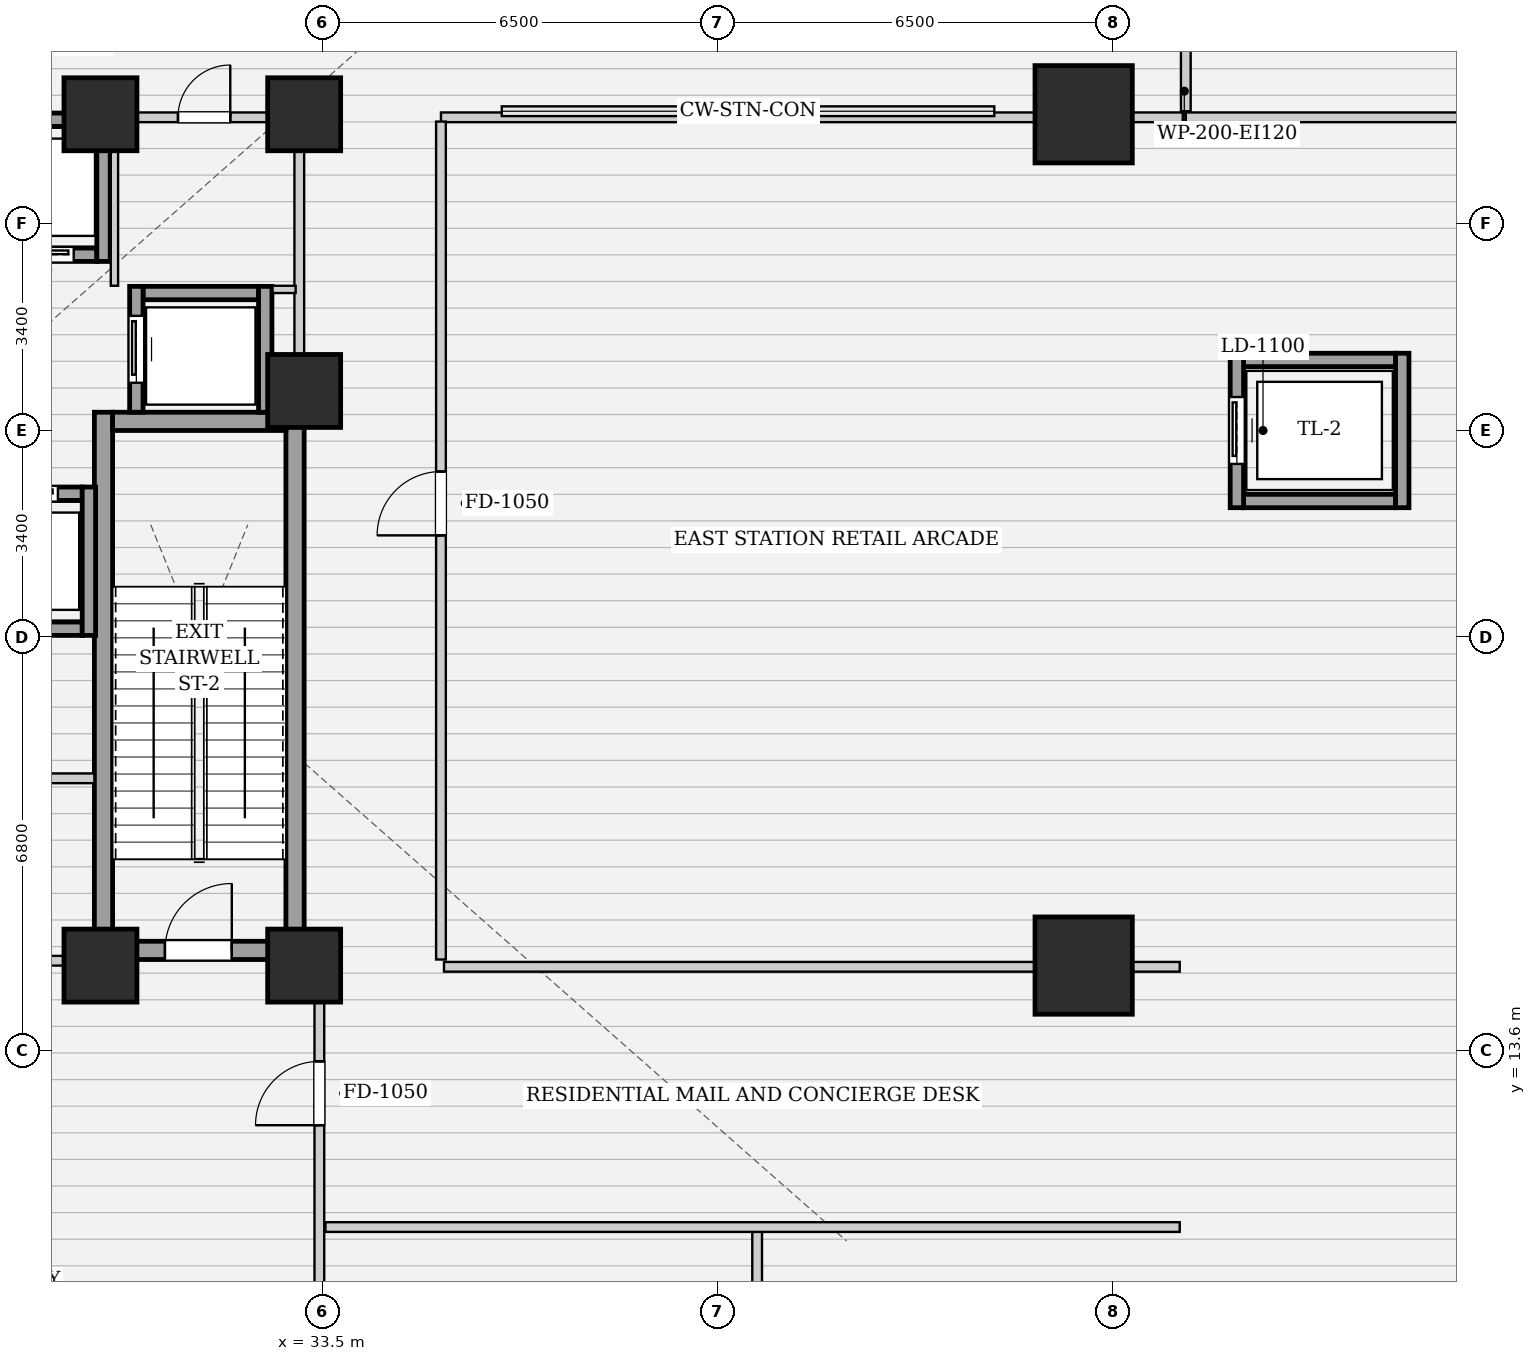
"""IFC4 building model, lengths in metres.
Left out: names, types, materials, properties, quantities, classifications, styles, units other than length and angle.
Written with IfcOpenShell. Run it as: python <this file> out.ifc"""

import sys

from ifc_helpers import new_model, si_unit, direction, frame, frame_2d, origin, origin_2d, place, context, subcontext, project, spatial, rectangle, extrude, element, fill, save


model = new_model("IFC4")
c1 = context("Model", 3, precision=1e-05, world=origin(), true_north=direction((0.0, 1.0)))
c2 = subcontext(c1, "Body", "Model", "MODEL_VIEW")
j1 = project(units=[si_unit("LENGTHUNIT", "METRE"), si_unit("PLANEANGLEUNIT", "RADIAN")], contexts=[c1])
p1 = place(None, origin())
s1 = spatial("IfcSite", under=j1, at=p1, CompositionType="ELEMENT")
p2 = place(p1, origin())
s2 = spatial("IfcBuilding", under=s1, at=p2, CompositionType="ELEMENT")
p3 = place(p2, origin())
s3 = spatial("IfcBuildingStorey", under=s2, at=p3, CompositionType="ELEMENT", Elevation=0.0)
for number, where, z_axis, x_axis in (
    (1, (46.02, 15.0, 0.0), (0.0, 0.0, 1.0), (1.0, 0.0, 0.0)),
    (2, (46.02, 29.0, 0.0), (0.0, 0.0, 1.0), (1.0, 0.0, 0.0)),
):
    element("IfcColumn", number, at=place(p3, frame(where, z_axis=z_axis, x_axis=x_axis)), inside=s3, PredefinedType="COLUMN", context=c2, shape_type="SweptSolid", body=[
        extrude(rectangle(XDim=1.6, YDim=1.6, at=origin_2d()), origin(), (0.0, 0.0, 1.0), 6.0),
    ])
for number, where, z_axis, x_axis in (
    (3, (29.85, 15.0, 0.0), (0.0, 0.0, 1.0), (1.0, 0.0, 0.0)),
    (4, (33.2, 15.0, 0.0), (0.0, 0.0, 1.0), (1.0, 0.0, 0.0)),
    (5, (29.85, 29.0, 0.0), (0.0, 0.0, 1.0), (1.0, 0.0, 0.0)),
    (6, (33.2, 29.0, 0.0), (0.0, 0.0, 1.0), (1.0, 0.0, 0.0)),
    (7, (33.2, 24.45, 0.0), (0.0, 0.0, 1.0), (1.0, 0.0, 0.0)),
):
    element("IfcColumn", number, at=place(p3, frame(where, z_axis=z_axis, x_axis=x_axis)), inside=s3, PredefinedType="COLUMN", context=c2, shape_type="SweptSolid", body=[
        extrude(rectangle(XDim=1.2, YDim=1.2, at=origin_2d()), origin(), (0.0, 0.0, 1.0), 6.0),
    ])
for number, where, z_axis, x_axis in (
    (8, (29.9, 15.1, 0.0), (0.0, 0.0, 1.0), (0.0, 1.0, 0.0)),
    (9, (33.05, 15.1, 0.0), (0.0, 0.0, 1.0), (0.0, 1.0, 0.0)),
):
    element("IfcWall", number, at=place(p3, frame(where, z_axis=z_axis, x_axis=x_axis)), inside=s3, PredefinedType="SHEAR", context=c2, shape_type="SweptSolid", body=[
        extrude(rectangle(XDim=9.0, YDim=0.3, at=frame_2d((4.5, 0.0))), origin(), (0.0, 0.0, 1.0), 5.68),
    ])
p4 = place(p3, frame((30.05, 23.95, 0.0), z_axis=(0.0, 0.0, 1.0), x_axis=(1.0, 0.0, 0.0)))
e10 = element("IfcWall", 10, at=p4, inside=s3, PredefinedType="SHEAR", context=c2, shape_type="SweptSolid", body=[
    extrude(rectangle(XDim=2.85, YDim=0.3, at=frame_2d((1.425, 0.0))), origin(), (0.0, 0.0, 1.0), 5.68),
])
p5 = place(p3, frame((30.05, 15.25, 0.0), z_axis=(0.0, 0.0, 1.0), x_axis=(1.0, 0.0, 0.0)))
e11 = element("IfcWall", 11, at=p5, inside=s3, PredefinedType="SHEAR", context=c2, shape_type="SweptSolid", body=[
    extrude(rectangle(XDim=2.85, YDim=0.3, at=frame_2d((1.425, 0.0))), origin(), (0.0, 0.0, 1.0), 5.68),
])
p6 = place(p5, frame((0.86, 0.0, 0.0)))
e12 = element("IfcOpeningElement", 12, at=p6, cuts=e11, PredefinedType="OPENING", context=c2, shape_type="SweptSolid", body=[
    extrude(rectangle(XDim=1.1, YDim=2.05, at=frame_2d((0.55, 1.025))), frame((0.0, 0.16, 0.0), z_axis=(0.0, -1.0, 0.0), x_axis=(1.0, 0.0, 0.0)), (0.0, 0.0, 1.0), 0.32),
])
p7 = place(p3, frame((27.93, 26.69, 0.0), z_axis=(0.0, 0.0, 1.0), x_axis=(1.0, 0.0, 0.0)))
e13 = element("IfcWall", 13, at=p7, inside=s3, PredefinedType="SHEAR", context=c2, shape_type="SweptSolid", body=[
    extrude(rectangle(XDim=1.86, YDim=0.22, at=frame_2d((0.93, 0.0))), origin(), (0.0, 0.0, 1.0), 5.68),
])
p8 = place(p7, frame((0.38, 0.0, 0.0)))
e14 = element("IfcOpeningElement", 14, at=p8, cuts=e13, PredefinedType="OPENING", context=c2, shape_type="SweptSolid", body=[
    extrude(rectangle(XDim=1.1, YDim=2.15, at=frame_2d((0.55, 1.075))), frame((0.0, 0.12, 0.0), z_axis=(0.0, -1.0, 0.0), x_axis=(1.0, 0.0, 0.0)), (0.0, 0.0, 1.0), 0.24),
])
p9 = place(p3, frame((27.93, 28.91, 0.0), z_axis=(0.0, 0.0, 1.0), x_axis=(1.0, 0.0, 0.0)))
e15 = element("IfcWall", 15, at=p9, inside=s3, PredefinedType="SHEAR", context=c2, shape_type="SweptSolid", body=[
    extrude(rectangle(XDim=1.86, YDim=0.22, at=frame_2d((0.93, 0.0))), origin(), (0.0, 0.0, 1.0), 5.68),
])
p10 = place(p3, frame((29.9, 26.58, 0.0), z_axis=(0.0, 0.0, 1.0), x_axis=(0.0, 1.0, 0.0)))
e16 = element("IfcWall", 16, at=p10, inside=s3, PredefinedType="SHEAR", context=c2, shape_type="SweptSolid", body=[
    extrude(rectangle(XDim=2.44, YDim=0.22, at=frame_2d((1.22, 0.0))), origin(), (0.0, 0.0, 1.0), 5.68),
])
p11 = place(p3, frame((27.65, 20.54, 0.0), z_axis=(0.0, 0.0, 1.0), x_axis=(1.0, 0.0, 0.0)))
e17 = element("IfcWall", 17, at=p11, inside=s3, PredefinedType="SHEAR", context=c2, shape_type="SweptSolid", body=[
    extrude(rectangle(XDim=1.9, YDim=0.22, at=frame_2d((0.95, 0.0))), origin(), (0.0, 0.0, 1.0), 5.68),
])
p12 = place(p3, frame((27.65, 22.76, 0.0), z_axis=(0.0, 0.0, 1.0), x_axis=(1.0, 0.0, 0.0)))
e18 = element("IfcWall", 18, at=p12, inside=s3, PredefinedType="SHEAR", context=c2, shape_type="SweptSolid", body=[
    extrude(rectangle(XDim=1.9, YDim=0.22, at=frame_2d((0.95, 0.0))), origin(), (0.0, 0.0, 1.0), 5.68),
])
p13 = place(p12, frame((0.4, 0.0, 0.0)))
e19 = element("IfcOpeningElement", 19, at=p13, cuts=e18, PredefinedType="OPENING", context=c2, shape_type="SweptSolid", body=[
    extrude(rectangle(XDim=1.1, YDim=2.15, at=frame_2d((0.55, 1.075))), frame((0.0, 0.12, 0.0), z_axis=(0.0, -1.0, 0.0), x_axis=(1.0, 0.0, 0.0)), (0.0, 0.0, 1.0), 0.24),
])
p14 = place(p3, frame((29.66, 20.43, 0.0), z_axis=(0.0, 0.0, 1.0), x_axis=(0.0, 1.0, 0.0)))
e20 = element("IfcWall", 20, at=p14, inside=s3, PredefinedType="SHEAR", context=c2, shape_type="SweptSolid", body=[
    extrude(rectangle(XDim=2.44, YDim=0.22, at=frame_2d((1.22, 0.0))), origin(), (0.0, 0.0, 1.0), 5.68),
])
p15 = place(p3, frame((30.55, 26.06, 0.0), z_axis=(0.0, 0.0, 1.0), x_axis=(1.0, 0.0, 0.0)))
e21 = element("IfcWall", 21, at=p15, inside=s3, PredefinedType="SHEAR", context=c2, shape_type="SweptSolid", body=[
    extrude(rectangle(XDim=1.9, YDim=0.22, at=frame_2d((0.95, 0.0))), origin(), (0.0, 0.0, 1.0), 5.68),
])
p16 = place(p3, frame((30.44, 24.1, 0.0), z_axis=(0.0, 0.0, 1.0), x_axis=(0.0, 1.0, 0.0)))
e22 = element("IfcWall", 22, at=p16, inside=s3, PredefinedType="SHEAR", context=c2, shape_type="SweptSolid", body=[
    extrude(rectangle(XDim=2.07, YDim=0.22, at=frame_2d((1.035, 0.0))), origin(), (0.0, 0.0, 1.0), 5.68),
])
p17 = place(p16, frame((0.485, 0.0, 0.0)))
e23 = element("IfcOpeningElement", 23, at=p17, cuts=e22, PredefinedType="OPENING", context=c2, shape_type="SweptSolid", body=[
    extrude(rectangle(XDim=1.1, YDim=2.15, at=frame_2d((0.55, 1.075))), frame((0.0, 0.12, 0.0), z_axis=(0.0, -1.0, 0.0), x_axis=(1.0, 0.0, 0.0)), (0.0, 0.0, 1.0), 0.24),
])
p18 = place(p3, frame((32.56, 24.1, 0.0), z_axis=(0.0, 0.0, 1.0), x_axis=(0.0, 1.0, 0.0)))
e24 = element("IfcWall", 24, at=p18, inside=s3, PredefinedType="SHEAR", context=c2, shape_type="SweptSolid", body=[
    extrude(rectangle(XDim=2.07, YDim=0.22, at=frame_2d((1.035, 0.0))), origin(), (0.0, 0.0, 1.0), 5.68),
])
for number, where, z_axis, x_axis in (
    (25, (48.65, 22.64, 0.0), (0.0, 0.0, 1.0), (1.0, 0.0, 0.0)),
    (26, (48.65, 24.96, 0.0), (0.0, 0.0, 1.0), (1.0, 0.0, 0.0)),
):
    element("IfcWall", number, at=place(p3, frame(where, z_axis=z_axis, x_axis=x_axis)), inside=s3, PredefinedType="SHEAR", context=c2, shape_type="SweptSolid", body=[
        extrude(rectangle(XDim=2.5, YDim=0.22, at=frame_2d((1.25, 0.0))), origin(), (0.0, 0.0, 1.0), 5.68),
    ])
p19 = place(p3, frame((48.54, 22.53, 0.0), z_axis=(0.0, 0.0, 1.0), x_axis=(0.0, 1.0, 0.0)))
e27 = element("IfcWall", 27, at=p19, inside=s3, PredefinedType="SHEAR", context=c2, shape_type="SweptSolid", body=[
    extrude(rectangle(XDim=2.54, YDim=0.22, at=frame_2d((1.27, 0.0))), origin(), (0.0, 0.0, 1.0), 5.68),
])
p20 = place(p19, frame((0.72, 0.0, 0.0)))
e28 = element("IfcOpeningElement", 28, at=p20, cuts=e27, PredefinedType="OPENING", context=c2, shape_type="SweptSolid", body=[
    extrude(rectangle(XDim=1.1, YDim=2.15, at=frame_2d((0.55, 1.075))), frame((0.0, 0.12, 0.0), z_axis=(0.0, -1.0, 0.0), x_axis=(1.0, 0.0, 0.0)), (0.0, 0.0, 1.0), 0.24),
])
p21 = place(p3, frame((51.26, 22.53, 0.0), z_axis=(0.0, 0.0, 1.0), x_axis=(0.0, 1.0, 0.0)))
e29 = element("IfcWall", 29, at=p21, inside=s3, PredefinedType="SHEAR", context=c2, shape_type="SweptSolid", body=[
    extrude(rectangle(XDim=2.54, YDim=0.22, at=frame_2d((1.27, 0.0))), origin(), (0.0, 0.0, 1.0), 5.68),
])
p22 = place(p3, frame((21.25, 15.08, 0.0), z_axis=(0.0, 0.0, 1.0), x_axis=(1.0, 0.0, 0.0)))
e30 = element("IfcWall", 30, at=p22, inside=s3, PredefinedType="PARTITIONING", context=c2, shape_type="SweptSolid", body=[
    extrude(rectangle(XDim=8.5, YDim=0.16, at=frame_2d((4.25, 0.0))), origin(), (0.0, 0.0, 1.0), 5.68),
])
p23 = place(p22, frame((3.725, 0.0, 0.0)))
e31 = element("IfcOpeningElement", 31, at=p23, cuts=e30, PredefinedType="OPENING", context=c2, shape_type="SweptSolid", body=[
    extrude(rectangle(XDim=1.05, YDim=2.05, at=frame_2d((0.525, 1.025))), frame((0.0, 0.09, 0.0), z_axis=(0.0, -1.0, 0.0), x_axis=(1.0, 0.0, 0.0)), (0.0, 0.0, 1.0), 0.18),
])
p24 = place(p3, frame((28.65, 18.08, 0.0), z_axis=(0.0, 0.0, 1.0), x_axis=(1.0, 0.0, 0.0)))
e32 = element("IfcWall", 32, at=p24, inside=s3, PredefinedType="PARTITIONING", context=c2, shape_type="SweptSolid", body=[
    extrude(rectangle(XDim=1.1, YDim=0.16, at=frame_2d((0.55, 0.0))), origin(), (0.0, 0.0, 1.0), 5.68),
])
p25 = place(p3, frame((33.12, 24.12, 0.0), z_axis=(0.0, 0.0, 1.0), x_axis=(0.0, 1.0, 0.0)))
e33 = element("IfcWall", 33, at=p25, inside=s3, PredefinedType="PARTITIONING", context=c2, shape_type="SweptSolid", body=[
    extrude(rectangle(XDim=4.76, YDim=0.16, at=frame_2d((2.38, 0.0))), origin(), (0.0, 0.0, 1.0), 5.68),
])
p26 = place(p3, frame((30.08, 26.18, 0.0), z_axis=(0.0, 0.0, 1.0), x_axis=(0.0, 1.0, 0.0)))
e34 = element("IfcWall", 34, at=p26, inside=s3, PredefinedType="PARTITIONING", context=c2, shape_type="SweptSolid", body=[
    extrude(rectangle(XDim=2.68, YDim=0.12, at=frame_2d((1.34, 0.0))), origin(), (0.0, 0.0, 1.0), 5.68),
])
p27 = place(p3, frame((32.68, 26.12, 0.0), z_axis=(0.0, 0.0, 1.0), x_axis=(1.0, 0.0, 0.0)))
e35 = element("IfcWall", 35, at=p27, inside=s3, PredefinedType="PARTITIONING", context=c2, shape_type="SweptSolid", body=[
    extrude(rectangle(XDim=0.38, YDim=0.12, at=frame_2d((0.19, 0.0))), origin(), (0.0, 0.0, 1.0), 5.68),
])
p28 = place(p3, frame((30.08, 28.95, 0.0), z_axis=(0.0, 0.0, 1.0), x_axis=(1.0, 0.0, 0.0)))
e36 = element("IfcWall", 36, at=p28, inside=s3, PredefinedType="PARTITIONING", context=c2, shape_type="SweptSolid", body=[
    extrude(rectangle(XDim=2.96, YDim=0.16, at=frame_2d((1.48, 0.0))), origin(), (0.0, 0.0, 1.0), 5.68),
])
p29 = place(p28, frame((1.045, 0.0, 0.0)))
e37 = element("IfcOpeningElement", 37, at=p29, cuts=e36, PredefinedType="OPENING", context=c2, shape_type="SweptSolid", body=[
    extrude(rectangle(XDim=0.86, YDim=2.05, at=frame_2d((0.43, 1.025))), frame((0.0, 0.09, 0.0), z_axis=(0.0, -1.0, 0.0), x_axis=(1.0, 0.0, 0.0)), (0.0, 0.0, 1.0), 0.18),
])
p30 = place(p3, frame((33.45, 5.6, 0.0), z_axis=(0.0, 0.0, 1.0), x_axis=(0.0, 1.0, 0.0)))
e38 = element("IfcWall", 38, at=p30, inside=s3, PredefinedType="PARTITIONING", context=c2, shape_type="SweptSolid", body=[
    extrude(rectangle(XDim=9.3, YDim=0.16, at=frame_2d((4.65, 0.0))), origin(), (0.0, 0.0, 1.0), 5.68),
])
p31 = place(p30, frame((2.175, 0.0, 0.0)))
e39 = element("IfcOpeningElement", 39, at=p31, cuts=e38, PredefinedType="OPENING", context=c2, shape_type="SweptSolid", body=[
    extrude(rectangle(XDim=1.05, YDim=2.05, at=frame_2d((0.525, 1.025))), frame((0.0, 0.09, 0.0), z_axis=(0.0, -1.0, 0.0), x_axis=(1.0, 0.0, 0.0)), (0.0, 0.0, 1.0), 0.18),
])
p32 = place(p30, frame((6.775, 0.0, 0.0)))
e40 = element("IfcOpeningElement", 40, at=p32, cuts=e38, PredefinedType="OPENING", context=c2, shape_type="SweptSolid", body=[
    extrude(rectangle(XDim=1.05, YDim=2.05, at=frame_2d((0.525, 1.025))), frame((0.0, 0.09, 0.0), z_axis=(0.0, -1.0, 0.0), x_axis=(1.0, 0.0, 0.0)), (0.0, 0.0, 1.0), 0.18),
])
p33 = place(p3, frame((40.65, 5.58, 0.0), z_axis=(0.0, 0.0, 1.0), x_axis=(0.0, 1.0, 0.0)))
e41 = element("IfcWall", 41, at=p33, inside=s3, PredefinedType="PARTITIONING", context=c2, shape_type="SweptSolid", body=[
    extrude(rectangle(XDim=5.07, YDim=0.16, at=frame_2d((2.535, 0.0))), origin(), (0.0, 0.0, 1.0), 5.68),
])
p34 = place(p3, frame((33.55, 10.7, 0.0), z_axis=(0.0, 0.0, 1.0), x_axis=(1.0, 0.0, 0.0)))
e42 = element("IfcWall", 42, at=p34, inside=s3, PredefinedType="PARTITIONING", context=c2, shape_type="SweptSolid", body=[
    extrude(rectangle(XDim=14.05, YDim=0.16, at=frame_2d((7.025, 0.0))), origin(), (0.0, 0.0, 1.0), 5.68),
])
p35 = place(p3, frame((35.5, 14.98, 0.0), z_axis=(0.0, 0.0, 1.0), x_axis=(1.0, 0.0, 0.0)))
e43 = element("IfcWall", 43, at=p35, inside=s3, PredefinedType="PARTITIONING", context=c2, shape_type="SweptSolid", body=[
    extrude(rectangle(XDim=12.1, YDim=0.16, at=frame_2d((6.05, 0.0))), origin(), (0.0, 0.0, 1.0), 4.565),
])
p36 = place(p3, frame((47.7, 29.05, 0.0), z_axis=(0.0, 0.0, 1.0), x_axis=(0.0, 1.0, 0.0)))
e44 = element("IfcWall", 44, at=p36, inside=s3, PredefinedType="PARTITIONING", context=c2, shape_type="SweptSolid", body=[
    extrude(rectangle(XDim=5.0, YDim=0.16, at=frame_2d((2.5, 0.0))), origin(), (0.0, 0.0, 1.0), 5.68),
])
p37 = place(p36, frame((2.06, 0.0, 0.0)))
e45 = element("IfcOpeningElement", 45, at=p37, cuts=e44, PredefinedType="OPENING", context=c2, shape_type="SweptSolid", body=[
    extrude(rectangle(XDim=1.05, YDim=2.05, at=frame_2d((0.525, 1.025))), frame((0.0, 0.09, 0.0), z_axis=(0.0, -1.0, 0.0), x_axis=(1.0, 0.0, 0.0)), (0.0, 0.0, 1.0), 0.18),
])
p38 = place(p3, frame((47.7, 28.95, 0.0), z_axis=(0.0, 0.0, 1.0), x_axis=(1.0, 0.0, 0.0)))
e46 = element("IfcWall", 46, at=p38, inside=s3, PredefinedType="PARTITIONING", context=c2, shape_type="SweptSolid", body=[
    extrude(rectangle(XDim=5.7, YDim=0.16, at=frame_2d((2.85, 0.0))), origin(), (0.0, 0.0, 1.0), 5.68),
])
p39 = place(p3, frame((35.45, 28.95, 0.0), z_axis=(0.0, 0.0, 1.0), x_axis=(1.0, 0.0, 0.0)))
e47 = element("IfcWall", 47, at=p39, inside=s3, PredefinedType="PARTITIONING", context=c2, shape_type="SweptSolid", body=[
    extrude(rectangle(XDim=12.2, YDim=0.16, at=frame_2d((6.1, 0.0))), origin(), (0.0, 0.0, 1.0), 4.565),
])
p40 = place(p3, frame((35.45, 15.1, 0.0), z_axis=(0.0, 0.0, 1.0), x_axis=(0.0, 1.0, 0.0)))
e48 = element("IfcWall", 48, at=p40, inside=s3, PredefinedType="PARTITIONING", context=c2, shape_type="SweptSolid", body=[
    extrude(rectangle(XDim=13.78, YDim=0.16, at=frame_2d((6.89, 0.0))), origin(), (0.0, 0.0, 1.0), 5.68),
])
p41 = place(p40, frame((6.975, 0.0, 0.0)))
e49 = element("IfcOpeningElement", 49, at=p41, cuts=e48, PredefinedType="OPENING", context=c2, shape_type="SweptSolid", body=[
    extrude(rectangle(XDim=1.05, YDim=2.05, at=frame_2d((0.525, 1.025))), frame((0.0, 0.09, 0.0), z_axis=(0.0, -1.0, 0.0), x_axis=(1.0, 0.0, 0.0)), (0.0, 0.0, 1.0), 0.18),
])
p42 = place(p6, origin())
e50 = element("IfcDoor", 50, at=p42, inside=s3, OperationType="SINGLE_SWING_RIGHT", PredefinedType="DOOR", context=c2, shape_type="SweptSolid", body=[
    extrude(rectangle(XDim=1.1, YDim=2.05, at=frame_2d((0.55, 1.025))), frame((0.0, 0.025, 0.0), z_axis=(0.0, -1.0, 0.0), x_axis=(1.0, 0.0, 0.0)), (0.0, 0.0, 1.0), 0.05),
])
fill(e12, e50)
p43 = place(p8, origin())
e51 = element("IfcDoor", 51, at=p43, inside=s3, OperationType="SLIDING_TO_LEFT", PredefinedType="DOOR", context=c2, shape_type="SweptSolid", body=[
    extrude(rectangle(XDim=1.1, YDim=2.15, at=frame_2d((0.55, 1.075))), frame((0.0, 0.025, 0.0), z_axis=(0.0, -1.0, 0.0), x_axis=(1.0, 0.0, 0.0)), (0.0, 0.0, 1.0), 0.05),
])
fill(e14, e51)
p44 = place(p13, origin())
e52 = element("IfcDoor", 52, at=p44, inside=s3, OperationType="SLIDING_TO_LEFT", PredefinedType="DOOR", context=c2, shape_type="SweptSolid", body=[
    extrude(rectangle(XDim=1.1, YDim=2.15, at=frame_2d((0.55, 1.075))), frame((0.0, 0.025, 0.0), z_axis=(0.0, -1.0, 0.0), x_axis=(1.0, 0.0, 0.0)), (0.0, 0.0, 1.0), 0.05),
])
fill(e19, e52)
p45 = place(p17, origin())
e53 = element("IfcDoor", 53, at=p45, inside=s3, OperationType="SLIDING_TO_LEFT", PredefinedType="DOOR", context=c2, shape_type="SweptSolid", body=[
    extrude(rectangle(XDim=1.1, YDim=2.15, at=frame_2d((0.55, 1.075))), frame((0.0, 0.025, 0.0), z_axis=(0.0, -1.0, 0.0), x_axis=(1.0, 0.0, 0.0)), (0.0, 0.0, 1.0), 0.05),
])
fill(e23, e53)
p46 = place(p20, origin())
e54 = element("IfcDoor", 54, at=p46, inside=s3, OperationType="SLIDING_TO_LEFT", PredefinedType="DOOR", context=c2, shape_type="SweptSolid", body=[
    extrude(rectangle(XDim=1.1, YDim=2.15, at=frame_2d((0.55, 1.075))), frame((0.0, 0.025, 0.0), z_axis=(0.0, -1.0, 0.0), x_axis=(1.0, 0.0, 0.0)), (0.0, 0.0, 1.0), 0.05),
])
fill(e28, e54)
p47 = place(p29, origin())
e55 = element("IfcDoor", 55, at=p47, inside=s3, OperationType="SINGLE_SWING_RIGHT", PredefinedType="DOOR", context=c2, shape_type="SweptSolid", body=[
    extrude(rectangle(XDim=0.86, YDim=2.05, at=frame_2d((0.43, 1.025))), frame((0.0, 0.025, 0.0), z_axis=(0.0, -1.0, 0.0), x_axis=(1.0, 0.0, 0.0)), (0.0, 0.0, 1.0), 0.05),
])
fill(e37, e55)
p48 = place(p32, origin())
e56 = element("IfcDoor", 56, at=p48, inside=s3, OperationType="SINGLE_SWING_LEFT", PredefinedType="DOOR", context=c2, shape_type="SweptSolid", body=[
    extrude(rectangle(XDim=1.05, YDim=2.05, at=frame_2d((0.525, 1.025))), frame((0.0, 0.025, 0.0), z_axis=(0.0, -1.0, 0.0), x_axis=(1.0, 0.0, 0.0)), (0.0, 0.0, 1.0), 0.05),
])
fill(e40, e56)
p49 = place(p41, origin())
e57 = element("IfcDoor", 57, at=p49, inside=s3, OperationType="SINGLE_SWING_LEFT", PredefinedType="DOOR", context=c2, shape_type="SweptSolid", body=[
    extrude(rectangle(XDim=1.05, YDim=2.05, at=frame_2d((0.525, 1.025))), frame((0.0, 0.025, 0.0), z_axis=(0.0, -1.0, 0.0), x_axis=(1.0, 0.0, 0.0)), (0.0, 0.0, 1.0), 0.05),
])
fill(e49, e57)
save(model, sys.argv[1])
